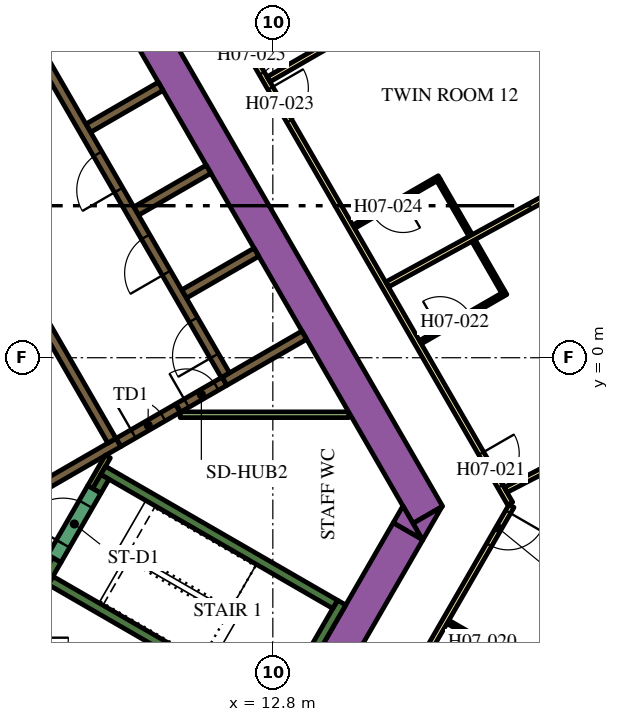
"""IFC4 building model, lengths in metres.
Left out: names, types, materials, properties, quantities, classifications, styles, units other than length and angle.
Written with IfcOpenShell. Run it as: python <this file> out.ifc"""

import sys

from ifc_helpers import new_model, si_unit, direction, frame, frame_2d, origin, place, context, subcontext, project, spatial, polyline, rectangle, outline, extrude, element, fill, save


model = new_model("IFC4")
c1 = context("Model", 3, precision=1e-05, world=origin(), true_north=direction((0.0, 1.0)))
c2 = subcontext(c1, "Body", "Model", "MODEL_VIEW")
j1 = project(units=[si_unit("LENGTHUNIT", "METRE"), si_unit("PLANEANGLEUNIT", "RADIAN")], contexts=[c1])
p1 = place(None, origin())
s1 = spatial("IfcSite", under=j1, at=p1, CompositionType="ELEMENT")
p2 = place(p1, origin())
s2 = spatial("IfcBuilding", under=s1, at=p2, CompositionType="ELEMENT")
p3 = place(p2, frame((0.0, 0.0, 95.4)))
s3 = spatial("IfcBuildingStorey", under=s2, at=p3, CompositionType="ELEMENT", Elevation=95.4)
p4 = place(p3, frame((6.776, 13.364, 0.0), z_axis=(0.0, 0.0, 1.0), x_axis=(0.500004177138, -0.8660229921, 0.0)))
e1 = element("IfcWall", 1, at=p4, inside=s3, PredefinedType="SOLIDWALL", context=c2, shape_type="SweptSolid", body=[
    extrude(rectangle(XDim=20.204, YDim=0.9, at=frame_2d((10.102, 0.0))), origin(), (0.0, 0.0, 1.0), 3.9),
])
p5 = place(p3, origin())
e2 = element("IfcWall", 2, at=p5, inside=s3, PredefinedType="SOLIDWALL", context=c2, shape_type="SweptSolid", body=[
    extrude(outline(polyline([(16.743, -4.8), (16.489, -4.36), (17.251, -3.92), (16.743, -4.8)])), origin(), (0.0, 0.0, 1.0), 3.9),
])
p6 = place(p3, frame((11.695, -12.644, 0.0), z_axis=(0.0, 0.0, 1.0), x_axis=(0.500010229568, 0.86601949766, 0.0)))
e3 = element("IfcWall", 3, at=p6, inside=s3, PredefinedType="SOLIDWALL", context=c2, shape_type="SweptSolid", body=[
    extrude(rectangle(XDim=9.326, YDim=0.9, at=frame_2d((4.663, 0.0))), origin(), (0.0, 0.0, 1.0), 3.9),
])
e4 = element("IfcWall", 4, at=p5, inside=s3, PredefinedType="SOLIDWALL", context=c2, shape_type="SweptSolid", body=[
    extrude(outline(polyline([(16.223, -3.9), (16.732, -4.78), (15.969, -4.34), (16.223, -3.9)])), origin(), (0.0, 0.0, 1.0), 3.9),
])
p7 = place(p3, frame((12.885, -9.431, 0.0), z_axis=(0.0, 0.0, 1.0), x_axis=(0.500020560727, 0.866013532718, 0.0)))
e5 = element("IfcWall", 5, at=p7, inside=s3, PredefinedType="SOLIDWALL", context=c2, shape_type="SweptSolid", body=[
    extrude(rectangle(XDim=3.45, YDim=0.25, at=frame_2d((1.725, 0.0))), origin(), (0.0, 0.0, 1.0), 3.9),
])
p8 = place(p3, frame((12.84, -9.261, 0.0), z_axis=(0.0, 0.0, 1.0), x_axis=(-0.866013990052, 0.500019768644, 0.0)))
e6 = element("IfcWall", 6, at=p8, inside=s3, PredefinedType="SOLIDWALL", context=c2, shape_type="SweptSolid", body=[
    extrude(rectangle(XDim=6.8, YDim=0.25, at=frame_2d((3.4, 0.0))), origin(), (0.0, 0.0, 1.0), 3.9),
])
p9 = place(p3, frame((6.78, -5.906, 0.0), z_axis=(0.0, 0.0, 1.0), x_axis=(0.500223362819, 0.865896406789, 0.0)))
e7 = element("IfcWall", 7, at=p9, inside=s3, PredefinedType="SOLIDWALL", context=c2, shape_type="SweptSolid", body=[
    extrude(rectangle(XDim=0.675, YDim=0.25, at=frame_2d((0.337, 0.0))), origin(), (0.0, 0.0, 1.0), 3.9),
])
p10 = place(p3, frame((8.334, -2.964, 0.0), z_axis=(0.0, 0.0, 1.0), x_axis=(0.866016039709, -0.500016218704, 0.0)))
e8 = element("IfcWall", 8, at=p10, inside=s3, PredefinedType="SOLIDWALL", context=c2, shape_type="SweptSolid", body=[
    extrude(rectangle(XDim=7.05, YDim=0.25, at=frame_2d((3.525, 0.0))), origin(), (0.0, 0.0, 1.0), 3.9),
])
p11 = place(p3, frame((8.168, -3.503, 0.0), z_axis=(0.0, 0.0, 1.0), x_axis=(0.49972245349, 0.866185586049, 0.0)))
e9 = element("IfcWall", 9, at=p11, inside=s3, PredefinedType="SOLIDWALL", context=c2, shape_type="SweptSolid", body=[
    extrude(rectangle(XDim=0.425, YDim=0.25, at=frame_2d((0.212, 0.0))), origin(), (0.0, 0.0, 1.0), 3.9),
])
p12 = place(p3, frame((10.464, 1.677, 0.0), z_axis=(0.0, 0.0, 1.0), x_axis=(0.86605622881, 0.499946605688, 0.0)))
e10 = element("IfcWall", 10, at=p12, inside=s3, PredefinedType="SOLIDWALL", context=c2, shape_type="SweptSolid", body=[
    extrude(rectangle(XDim=2.2, YDim=0.25, at=frame_2d((1.1, 0.0))), origin(), (0.0, 0.0, 1.0), 3.9),
])
p13 = place(p3, frame((13.629, 0.594, 0.0), z_axis=(0.0, 0.0, 1.0), x_axis=(-0.866063384774, -0.499934209226, 0.0)))
e11 = element("IfcWall", 11, at=p13, inside=s3, PredefinedType="SOLIDWALL", context=c2, shape_type="SweptSolid", body=[
    extrude(rectangle(XDim=2.428, YDim=0.25, at=frame_2d((1.214, 0.0))), origin(), (0.0, 0.0, 1.0), 3.9),
])
p14 = place(p3, frame((6.614, -3.456, 0.0), z_axis=(0.0, 0.0, 1.0), x_axis=(0.866031582473, 0.499989298045, 0.0)))
e12 = element("IfcWall", 12, at=p14, inside=s3, PredefinedType="SOLIDWALL", context=c2, shape_type="SweptSolid", body=[
    extrude(rectangle(XDim=2.455, YDim=0.25, at=frame_2d((1.228, 0.0))), origin(), (0.0, 0.0, 1.0), 3.9),
])
for number, where, z_axis, x_axis in (
    (13, (7.944, 6.041, 0.0), (0.0, 0.0, 1.0), (0.866, 0.5, 0.0)),
    (14, (9.204, 3.859, 0.0), (0.0, 0.0, 1.0), (0.866, 0.5, 0.0)),
):
    element("IfcWall", number, at=place(p3, frame(where, z_axis=z_axis, x_axis=x_axis)), inside=s3, PredefinedType="SOLIDWALL", context=c2, shape_type="SweptSolid", body=[
        extrude(rectangle(XDim=2.2, YDim=0.25, at=frame_2d((1.1, 0.0))), origin(), (0.0, 0.0, 1.0), 3.9),
    ])
p15 = place(p3, frame((6.945, -5.222, 0.0), z_axis=(0.0, 0.0, 1.0), x_axis=(-0.499818422106, -0.866130212453, 0.0)))
e15 = element("IfcWall", 15, at=p15, inside=s3, PredefinedType="PARTITIONING", context=c2, shape_type="SweptSolid", body=[
    extrude(rectangle(XDim=0.514, YDim=0.15, at=frame_2d((0.257, 0.0))), origin(), (0.0, 0.0, 1.0), 2.75),
])
p16 = place(p3, frame((8.459, -2.599, 0.0), z_axis=(0.0, 0.0, 1.0), x_axis=(-0.500041054325, -0.866001699761, 0.0)))
e16 = element("IfcWall", 16, at=p16, inside=s3, PredefinedType="PARTITIONING", context=c2, shape_type="SweptSolid", body=[
    extrude(rectangle(XDim=0.929, YDim=0.15, at=frame_2d((0.464, 0.0))), origin(), (0.0, 0.0, 1.0), 3.9),
])
p17 = place(p3, frame((10.362, -1.5, 0.0), z_axis=(0.0, 0.0, 1.0), x_axis=(1.0, 0.0, 0.0)))
e17 = element("IfcWall", 17, at=p17, inside=s3, PredefinedType="PARTITIONING", context=c2, shape_type="SweptSolid", body=[
    extrude(rectangle(XDim=4.439, YDim=0.15, at=frame_2d((2.22, 0.0))), origin(), (0.0, 0.0, 1.0), 2.75),
])
p18 = place(p3, frame((11.553, -0.46, 0.0), z_axis=(0.0, 0.0, 1.0), x_axis=(-0.500006514828, 0.866021642414, 0.0)))
e18 = element("IfcWall", 18, at=p18, inside=s3, PredefinedType="SOLIDWALL", context=c2, shape_type="SweptSolid", body=[
    extrude(rectangle(XDim=12.35, YDim=0.25, at=frame_2d((6.175, 0.0))), origin(), (0.0, 0.0, 1.0), 3.9),
])
p19 = place(p18, frame((0.585, 0.0, 0.0)))
e19 = element("IfcOpeningElement", 19, at=p19, cuts=e18, PredefinedType="OPENING", context=c2, shape_type="SweptSolid", body=[
    extrude(rectangle(XDim=1.1, YDim=2.1, at=frame_2d((0.55, 1.05))), frame((0.0, 0.135, 0.0), z_axis=(0.0, -1.0, 0.0), x_axis=(1.0, 0.0, 0.0)), (0.0, 0.0, 1.0), 0.27),
])
p20 = place(p18, frame((3.105, 0.0, 0.0)))
e20 = element("IfcOpeningElement", 20, at=p20, cuts=e18, PredefinedType="OPENING", context=c2, shape_type="SweptSolid", body=[
    extrude(rectangle(XDim=1.1, YDim=2.1, at=frame_2d((0.55, 1.05))), frame((0.0, 0.135, 0.0), z_axis=(0.0, -1.0, 0.0), x_axis=(1.0, 0.0, 0.0)), (0.0, 0.0, 1.0), 0.27),
])
p21 = place(p18, frame((5.625, 0.0, 0.0)))
e21 = element("IfcOpeningElement", 21, at=p21, cuts=e18, PredefinedType="OPENING", context=c2, shape_type="SweptSolid", body=[
    extrude(rectangle(XDim=1.1, YDim=2.1, at=frame_2d((0.55, 1.05))), frame((0.0, 0.135, 0.0), z_axis=(0.0, -1.0, 0.0), x_axis=(1.0, 0.0, 0.0)), (0.0, 0.0, 1.0), 0.27),
])
p22 = place(p3, frame((8.565, -2.185, 0.0), z_axis=(0.0, 0.0, 1.0), x_axis=(-0.499997954832, 0.866026584559, 0.0)))
e22 = element("IfcWall", 22, at=p22, inside=s3, PredefinedType="SOLIDWALL", context=c2, shape_type="SweptSolid", body=[
    extrude(rectangle(XDim=12.35, YDim=0.25, at=frame_2d((6.175, 0.0))), origin(), (0.0, 0.0, 1.0), 3.9),
])
p23 = place(p22, frame((5.725, 0.0, 0.0)))
e23 = element("IfcOpeningElement", 23, at=p23, cuts=e22, PredefinedType="OPENING", context=c2, shape_type="SweptSolid", body=[
    extrude(rectangle(XDim=0.9, YDim=2.1, at=frame_2d((0.45, 1.05))), frame((0.0, 0.135, 0.0), z_axis=(0.0, -1.0, 0.0), x_axis=(1.0, 0.0, 0.0)), (0.0, 0.0, 1.0), 0.27),
])
p24 = place(p3, frame((7.053, -5.284, 0.0), z_axis=(0.0, 0.0, 1.0), x_axis=(0.500078061341, 0.865980330357, 0.0)))
e24 = element("IfcWall", 24, at=p24, inside=s3, PredefinedType="SOLIDWALL", context=c2, shape_type="SweptSolid", body=[
    extrude(rectangle(XDim=2.1, YDim=0.4, at=frame_2d((1.05, 0.0))), origin(), (0.0, 0.0, 1.0), 3.9),
])
p25 = place(p24, frame((0.45, 0.0, 0.0)))
e25 = element("IfcOpeningElement", 25, at=p25, cuts=e24, PredefinedType="OPENING", context=c2, shape_type="SweptSolid", body=[
    extrude(rectangle(XDim=1.2, YDim=2.1, at=frame_2d((0.6, 1.05))), frame((0.0, 0.21, 0.0), z_axis=(0.0, -1.0, 0.0), x_axis=(1.0, 0.0, 0.0)), (0.0, 0.0, 1.0), 0.42),
])
p26 = place(p3, frame((8.74, -2.229, 0.0), z_axis=(0.0, 0.0, 1.0), x_axis=(0.865989075817, 0.500062916607, 0.0)))
e26 = element("IfcWall", 26, at=p26, inside=s3, PredefinedType="SOLIDWALL", context=c2, shape_type="SweptSolid", body=[
    extrude(rectangle(XDim=1.8, YDim=0.25, at=frame_2d((0.9, 0.0))), origin(), (0.0, 0.0, 1.0), 3.9),
])
p27 = place(p26, frame((0.45, 0.0, 0.0)))
e27 = element("IfcOpeningElement", 27, at=p27, cuts=e26, PredefinedType="OPENING", context=c2, shape_type="SweptSolid", body=[
    extrude(rectangle(XDim=0.9, YDim=2.1, at=frame_2d((0.45, 1.05))), frame((0.0, 0.135, 0.0), z_axis=(0.0, -1.0, 0.0), x_axis=(1.0, 0.0, 0.0)), (0.0, 0.0, 1.0), 0.27),
])
p28 = place(p3, frame((10.313, -1.32, 0.0), z_axis=(0.0, 0.0, 1.0), x_axis=(0.866034573852, 0.49998411664, 0.0)))
e28 = element("IfcWall", 28, at=p28, inside=s3, PredefinedType="SOLIDWALL", context=c2, shape_type="SweptSolid", body=[
    extrude(rectangle(XDim=1.4, YDim=0.25, at=frame_2d((0.7, 0.0))), origin(), (0.0, 0.0, 1.0), 3.9),
])
p29 = place(p28, frame((0.25, 0.0, 0.0)))
e29 = element("IfcOpeningElement", 29, at=p29, cuts=e28, PredefinedType="OPENING", context=c2, shape_type="SweptSolid", body=[
    extrude(rectangle(XDim=0.9, YDim=2.1, at=frame_2d((0.45, 1.05))), frame((0.0, 0.135, 0.0), z_axis=(0.0, -1.0, 0.0), x_axis=(1.0, 0.0, 0.0)), (0.0, 0.0, 1.0), 0.27),
])
p30 = place(p3, frame((19.081, -3.9, 0.0), z_axis=(0.0, 0.0, 1.0), x_axis=(-0.499974327079, -0.866040225545, 0.0)))
e30 = element("IfcWall", 30, at=p30, inside=s3, PredefinedType="PARTITIONING", context=c2, shape_type="SweptSolid", body=[
    extrude(rectangle(XDim=5.258, YDim=0.15, at=frame_2d((2.629, 0.0))), origin(), (0.0, 0.0, 1.0), 2.75),
])
p31 = place(p30, frame((0.18, 0.0, 0.0)))
e31 = element("IfcOpeningElement", 31, at=p31, cuts=e30, PredefinedType="OPENING", context=c2, shape_type="SweptSolid", body=[
    extrude(rectangle(XDim=1.0, YDim=2.1, at=frame_2d((0.5, 1.05))), frame((0.0, 0.085, 0.0), z_axis=(0.0, -1.0, 0.0), x_axis=(1.0, 0.0, 0.0)), (0.0, 0.0, 1.0), 0.17),
])
p32 = place(p3, frame((6.163, 18.475, 0.0), z_axis=(0.0, 0.0, 1.0), x_axis=(0.500001317485, -0.866024643133, 0.0)))
e32 = element("IfcWall", 32, at=p32, inside=s3, PredefinedType="PARTITIONING", context=c2, shape_type="SweptSolid", body=[
    extrude(rectangle(XDim=25.767, YDim=0.15, at=frame_2d((12.883, 0.0))), origin(), (0.0, 0.0, 1.0), 2.75),
])
p33 = place(p32, frame((24.241, 0.0, 0.0)))
e33 = element("IfcOpeningElement", 33, at=p33, cuts=e32, PredefinedType="OPENING", context=c2, shape_type="SweptSolid", body=[
    extrude(rectangle(XDim=1.0, YDim=2.1, at=frame_2d((0.5, 1.05))), frame((0.0, 0.085, 0.0), z_axis=(0.0, -1.0, 0.0), x_axis=(1.0, 0.0, 0.0)), (0.0, 0.0, 1.0), 0.17),
])
p34 = place(p32, frame((13.144, 0.0, 0.0)))
e34 = element("IfcOpeningElement", 34, at=p34, cuts=e32, PredefinedType="OPENING", context=c2, shape_type="SweptSolid", body=[
    extrude(rectangle(XDim=1.0, YDim=2.1, at=frame_2d((0.5, 1.05))), frame((0.0, 0.085, 0.0), z_axis=(0.0, -1.0, 0.0), x_axis=(1.0, 0.0, 0.0)), (0.0, 0.0, 1.0), 0.17),
])
p35 = place(p32, frame((11.592, 0.0, 0.0)))
e35 = element("IfcOpeningElement", 35, at=p35, cuts=e32, PredefinedType="OPENING", context=c2, shape_type="SweptSolid", body=[
    extrude(rectangle(XDim=1.1, YDim=2.1, at=frame_2d((0.55, 1.05))), frame((0.0, 0.085, 0.0), z_axis=(0.0, -1.0, 0.0), x_axis=(1.0, 0.0, 0.0)), (0.0, 0.0, 1.0), 0.17),
])
p36 = place(p32, frame((4.674, 0.0, 0.0)))
e36 = element("IfcOpeningElement", 36, at=p36, cuts=e32, PredefinedType="OPENING", context=c2, shape_type="SweptSolid", body=[
    extrude(rectangle(XDim=0.9, YDim=2.1, at=frame_2d((0.45, 1.05))), frame((0.0, 0.085, 0.0), z_axis=(0.0, -1.0, 0.0), x_axis=(1.0, 0.0, 0.0)), (0.0, 0.0, 1.0), 0.17),
])
p37 = place(p32, frame((2.411, 0.0, 0.0)))
e37 = element("IfcOpeningElement", 37, at=p37, cuts=e32, PredefinedType="OPENING", context=c2, shape_type="SweptSolid", body=[
    extrude(rectangle(XDim=1.0, YDim=2.1, at=frame_2d((0.5, 1.05))), frame((0.0, 0.085, 0.0), z_axis=(0.0, -1.0, 0.0), x_axis=(1.0, 0.0, 0.0)), (0.0, 0.0, 1.0), 0.17),
])
p38 = place(p3, frame((18.484, 10.672, 0.0), z_axis=(0.0, 0.0, 1.0), x_axis=(-0.866019162053, -0.50001081084, 0.0)))
e38 = element("IfcWall", 38, at=p38, inside=s3, PredefinedType="PARTITIONING", context=c2, shape_type="SweptSolid", body=[
    extrude(rectangle(XDim=6.694, YDim=0.15, at=frame_2d((3.347, 0.0))), origin(), (0.0, 0.0, 1.0), 2.75),
])
p39 = place(p3, frame((21.614, 5.102, 0.0), z_axis=(0.0, 0.0, 1.0), x_axis=(-0.877484555087, -0.479604895287, 0.0)))
e39 = element("IfcWall", 39, at=p39, inside=s3, PredefinedType="PARTITIONING", context=c2, shape_type="SweptSolid", body=[
    extrude(rectangle(XDim=6.611, YDim=0.15, at=frame_2d((3.306, 0.0))), origin(), (0.0, 0.0, 1.0), 2.75),
])
p40 = place(p3, frame((24.613, -0.541, 0.0), z_axis=(0.0, 0.0, 1.0), x_axis=(-0.888459912519, -0.458954228487, 0.0)))
e40 = element("IfcWall", 40, at=p40, inside=s3, PredefinedType="PARTITIONING", context=c2, shape_type="SweptSolid", body=[
    extrude(rectangle(XDim=6.392, YDim=0.15, at=frame_2d((3.196, 0.0))), origin(), (0.0, 0.0, 1.0), 2.75),
])
p41 = place(p3, frame((27.479, -6.251, 0.0), z_axis=(0.0, 0.0, 1.0), x_axis=(-0.898945877276, -0.438059710231, 0.0)))
e41 = element("IfcWall", 41, at=p41, inside=s3, PredefinedType="PARTITIONING", context=c2, shape_type="SweptSolid", body=[
    extrude(rectangle(XDim=8.909, YDim=0.15, at=frame_2d((4.455, 0.0))), origin(), (0.0, 0.0, 1.0), 2.75),
])
p42 = place(p3, frame((19.659, -8.25, 0.0), z_axis=(0.0, 0.0, 1.0), x_axis=(-0.866021400173, 0.500006934395, 0.0)))
e42 = element("IfcWall", 42, at=p42, inside=s3, PredefinedType="PARTITIONING", context=c2, shape_type="SweptSolid", body=[
    extrude(rectangle(XDim=2.6, YDim=0.1, at=frame_2d((1.3, 0.0))), origin(), (0.0, 0.0, 1.0), 2.75),
])
p43 = place(p42, frame((1.1, 0.0, 0.0)))
e43 = element("IfcOpeningElement", 43, at=p43, cuts=e42, PredefinedType="OPENING", context=c2, shape_type="SweptSolid", body=[
    extrude(rectangle(XDim=0.9, YDim=2.1, at=frame_2d((0.45, 1.05))), frame((0.0, 0.06, 0.0), z_axis=(0.0, -1.0, 0.0), x_axis=(1.0, 0.0, 0.0)), (0.0, 0.0, 1.0), 0.12),
])
p44 = place(p3, frame((16.681, 0.407, 0.0), z_axis=(0.0, 0.0, 1.0), x_axis=(0.866021400173, 0.500006934395, 0.0)))
e44 = element("IfcWall", 44, at=p44, inside=s3, PredefinedType="PARTITIONING", context=c2, shape_type="SweptSolid", body=[
    extrude(rectangle(XDim=2.6, YDim=0.1, at=frame_2d((1.3, 0.0))), origin(), (0.0, 0.0, 1.0), 2.75),
])
p45 = place(p44, frame((0.6, 0.0, 0.0)))
e45 = element("IfcOpeningElement", 45, at=p45, cuts=e44, PredefinedType="OPENING", context=c2, shape_type="SweptSolid", body=[
    extrude(rectangle(XDim=0.9, YDim=2.1, at=frame_2d((0.45, 1.05))), frame((0.0, 0.06, 0.0), z_axis=(0.0, -1.0, 0.0), x_axis=(1.0, 0.0, 0.0)), (0.0, 0.0, 1.0), 0.12),
])
p46 = place(p3, frame((18.86, 1.734, 0.0), z_axis=(0.0, 0.0, 1.0), x_axis=(-0.500017819788, 0.86601511528, 0.0)))
e46 = element("IfcWall", 46, at=p46, inside=s3, PredefinedType="PARTITIONING", context=c2, shape_type="SweptSolid", body=[
    extrude(rectangle(XDim=1.55, YDim=0.1, at=frame_2d((0.775, 0.0))), origin(), (0.0, 0.0, 1.0), 2.75),
])
p47 = place(p3, frame((17.179, 4.745, 0.0), z_axis=(0.0, 0.0, 1.0), x_axis=(-0.866021400173, -0.500006934395, 0.0)))
e47 = element("IfcWall", 47, at=p47, inside=s3, PredefinedType="PARTITIONING", context=c2, shape_type="SweptSolid", body=[
    extrude(rectangle(XDim=2.6, YDim=0.1, at=frame_2d((1.3, 0.0))), origin(), (0.0, 0.0, 1.0), 2.75),
])
p48 = place(p47, frame((1.1, 0.0, 0.0)))
e48 = element("IfcOpeningElement", 48, at=p48, cuts=e47, PredefinedType="OPENING", context=c2, shape_type="SweptSolid", body=[
    extrude(rectangle(XDim=0.9, YDim=2.1, at=frame_2d((0.45, 1.05))), frame((0.0, 0.06, 0.0), z_axis=(0.0, -1.0, 0.0), x_axis=(1.0, 0.0, 0.0)), (0.0, 0.0, 1.0), 0.12),
])
p49 = place(p3, frame((17.161, 4.677, 0.0), z_axis=(0.0, 0.0, 1.0), x_axis=(0.499890179513, -0.866088799389, 0.0)))
e49 = element("IfcWall", 49, at=p49, inside=s3, PredefinedType="PARTITIONING", context=c2, shape_type="SweptSolid", body=[
    extrude(rectangle(XDim=1.68, YDim=0.1, at=frame_2d((0.84, 0.0))), origin(), (0.0, 0.0, 1.0), 2.75),
])
p50 = place(p3, frame((21.956, 6.033, 0.0), z_axis=(0.0, 0.0, 1.0), x_axis=(-0.48983164787, 0.87181704316, 0.0)))
e50 = element("IfcWall", 50, at=p50, inside=s3, PredefinedType="SOLIDWALL", context=c2, shape_type="SweptSolid", body=[
    extrude(rectangle(XDim=5.1, YDim=0.29, at=frame_2d((2.55, 0.0))), origin(), (0.0, 0.0, 1.0), 3.65),
])
p51 = place(p50, frame((0.273, 0.0, 0.9)))
e51 = element("IfcOpeningElement", 51, at=p51, cuts=e50, PredefinedType="OPENING", context=c2, shape_type="SweptSolid", body=[
    extrude(rectangle(XDim=1.35, YDim=2.15, at=frame_2d((0.675, 1.075))), frame((0.0, 0.155, 0.0), z_axis=(0.0, -1.0, 0.0), x_axis=(1.0, 0.0, 0.0)), (0.0, 0.0, 1.0), 0.31),
])
p52 = place(p50, frame((3.478, 0.0, 0.9)))
e52 = element("IfcOpeningElement", 52, at=p52, cuts=e50, PredefinedType="OPENING", context=c2, shape_type="SweptSolid", body=[
    extrude(rectangle(XDim=1.35, YDim=2.15, at=frame_2d((0.675, 1.075))), frame((0.0, 0.155, 0.0), z_axis=(0.0, -1.0, 0.0), x_axis=(1.0, 0.0, 0.0)), (0.0, 0.0, 1.0), 0.31),
])
p53 = place(p19, origin())
e53 = element("IfcDoor", 53, at=p53, inside=s3, OperationType="DOUBLE_DOOR_SLIDING", PredefinedType="DOOR", context=c2, shape_type="SweptSolid", body=[
    extrude(rectangle(XDim=1.1, YDim=2.1, at=frame_2d((0.55, 1.05))), frame((0.0, 0.025, 0.0), z_axis=(0.0, -1.0, 0.0), x_axis=(1.0, 0.0, 0.0)), (0.0, 0.0, 1.0), 0.05),
])
fill(e19, e53)
p54 = place(p20, origin())
e54 = element("IfcDoor", 54, at=p54, inside=s3, OperationType="DOUBLE_DOOR_SLIDING", PredefinedType="DOOR", context=c2, shape_type="SweptSolid", body=[
    extrude(rectangle(XDim=1.1, YDim=2.1, at=frame_2d((0.55, 1.05))), frame((0.0, 0.025, 0.0), z_axis=(0.0, -1.0, 0.0), x_axis=(1.0, 0.0, 0.0)), (0.0, 0.0, 1.0), 0.05),
])
fill(e20, e54)
p55 = place(p21, origin())
e55 = element("IfcDoor", 55, at=p55, inside=s3, OperationType="DOUBLE_DOOR_SLIDING", PredefinedType="DOOR", context=c2, shape_type="SweptSolid", body=[
    extrude(rectangle(XDim=1.1, YDim=2.1, at=frame_2d((0.55, 1.05))), frame((0.0, 0.025, 0.0), z_axis=(0.0, -1.0, 0.0), x_axis=(1.0, 0.0, 0.0)), (0.0, 0.0, 1.0), 0.05),
])
fill(e21, e55)
p56 = place(p25, origin())
e56 = element("IfcDoor", 56, at=p56, inside=s3, OperationType="SINGLE_SWING_LEFT", PredefinedType="DOOR", context=c2, shape_type="SweptSolid", body=[
    extrude(rectangle(XDim=1.2, YDim=2.1, at=frame_2d((0.6, 1.05))), frame((0.0, 0.025, 0.0), z_axis=(0.0, -1.0, 0.0), x_axis=(1.0, 0.0, 0.0)), (0.0, 0.0, 1.0), 0.05),
])
fill(e25, e56)
p57 = place(p27, origin())
e57 = element("IfcDoor", 57, at=p57, inside=s3, OperationType="SINGLE_SWING_LEFT", PredefinedType="DOOR", context=c2, shape_type="SweptSolid", body=[
    extrude(rectangle(XDim=0.9, YDim=2.1, at=frame_2d((0.45, 1.05))), frame((0.0, 0.025, 0.0), z_axis=(0.0, -1.0, 0.0), x_axis=(1.0, 0.0, 0.0)), (0.0, 0.0, 1.0), 0.05),
])
fill(e27, e57)
p58 = place(p29, origin())
e58 = element("IfcDoor", 58, at=p58, inside=s3, OperationType="SINGLE_SWING_LEFT", PredefinedType="DOOR", context=c2, shape_type="SweptSolid", body=[
    extrude(rectangle(XDim=0.9, YDim=2.1, at=frame_2d((0.45, 1.05))), frame((0.0, 0.025, 0.0), z_axis=(0.0, -1.0, 0.0), x_axis=(1.0, 0.0, 0.0)), (0.0, 0.0, 1.0), 0.05),
])
fill(e29, e58)
p59 = place(p31, origin())
e59 = element("IfcDoor", 59, at=p59, inside=s3, OperationType="SINGLE_SWING_LEFT", PredefinedType="DOOR", context=c2, shape_type="SweptSolid", body=[
    extrude(rectangle(XDim=1.0, YDim=2.1, at=frame_2d((0.5, 1.05))), frame((0.0, 0.025, 0.0), z_axis=(0.0, -1.0, 0.0), x_axis=(1.0, 0.0, 0.0)), (0.0, 0.0, 1.0), 0.05),
])
fill(e31, e59)
p60 = place(p43, origin())
e60 = element("IfcDoor", 60, at=p60, inside=s3, OperationType="SINGLE_SWING_LEFT", PredefinedType="DOOR", context=c2, shape_type="SweptSolid", body=[
    extrude(rectangle(XDim=0.9, YDim=2.1, at=frame_2d((0.45, 1.05))), frame((0.0, 0.025, 0.0), z_axis=(0.0, -1.0, 0.0), x_axis=(1.0, 0.0, 0.0)), (0.0, 0.0, 1.0), 0.05),
])
fill(e43, e60)
p61 = place(p33, origin())
e61 = element("IfcDoor", 61, at=p61, inside=s3, OperationType="SINGLE_SWING_RIGHT", PredefinedType="DOOR", context=c2, shape_type="SweptSolid", body=[
    extrude(rectangle(XDim=1.0, YDim=2.1, at=frame_2d((0.5, 1.05))), frame((0.0, 0.025, 0.0), z_axis=(0.0, -1.0, 0.0), x_axis=(1.0, 0.0, 0.0)), (0.0, 0.0, 1.0), 0.05),
])
fill(e33, e61)
p62 = place(p45, origin())
e62 = element("IfcDoor", 62, at=p62, inside=s3, OperationType="SINGLE_SWING_LEFT", PredefinedType="DOOR", context=c2, shape_type="SweptSolid", body=[
    extrude(rectangle(XDim=0.9, YDim=2.1, at=frame_2d((0.45, 1.05))), frame((0.0, 0.025, 0.0), z_axis=(0.0, -1.0, 0.0), x_axis=(1.0, 0.0, 0.0)), (0.0, 0.0, 1.0), 0.05),
])
fill(e45, e62)
p63 = place(p34, origin())
e63 = element("IfcDoor", 63, at=p63, inside=s3, OperationType="SINGLE_SWING_LEFT", PredefinedType="DOOR", context=c2, shape_type="SweptSolid", body=[
    extrude(rectangle(XDim=1.0, YDim=2.1, at=frame_2d((0.5, 1.05))), frame((0.0, 0.025, 0.0), z_axis=(0.0, -1.0, 0.0), x_axis=(1.0, 0.0, 0.0)), (0.0, 0.0, 1.0), 0.05),
])
fill(e34, e63)
p64 = place(p48, origin())
e64 = element("IfcDoor", 64, at=p64, inside=s3, OperationType="SINGLE_SWING_RIGHT", PredefinedType="DOOR", context=c2, shape_type="SweptSolid", body=[
    extrude(rectangle(XDim=0.9, YDim=2.1, at=frame_2d((0.45, 1.05))), frame((0.0, 0.025, 0.0), z_axis=(0.0, -1.0, 0.0), x_axis=(1.0, 0.0, 0.0)), (0.0, 0.0, 1.0), 0.05),
])
fill(e48, e64)
p65 = place(p35, origin())
e65 = element("IfcDoor", 65, at=p65, inside=s3, OperationType="SINGLE_SWING_RIGHT", PredefinedType="DOOR", context=c2, shape_type="SweptSolid", body=[
    extrude(rectangle(XDim=1.1, YDim=2.1, at=frame_2d((0.55, 1.05))), frame((0.0, 0.025, 0.0), z_axis=(0.0, -1.0, 0.0), x_axis=(1.0, 0.0, 0.0)), (0.0, 0.0, 1.0), 0.05),
])
fill(e35, e65)
save(model, sys.argv[1])
